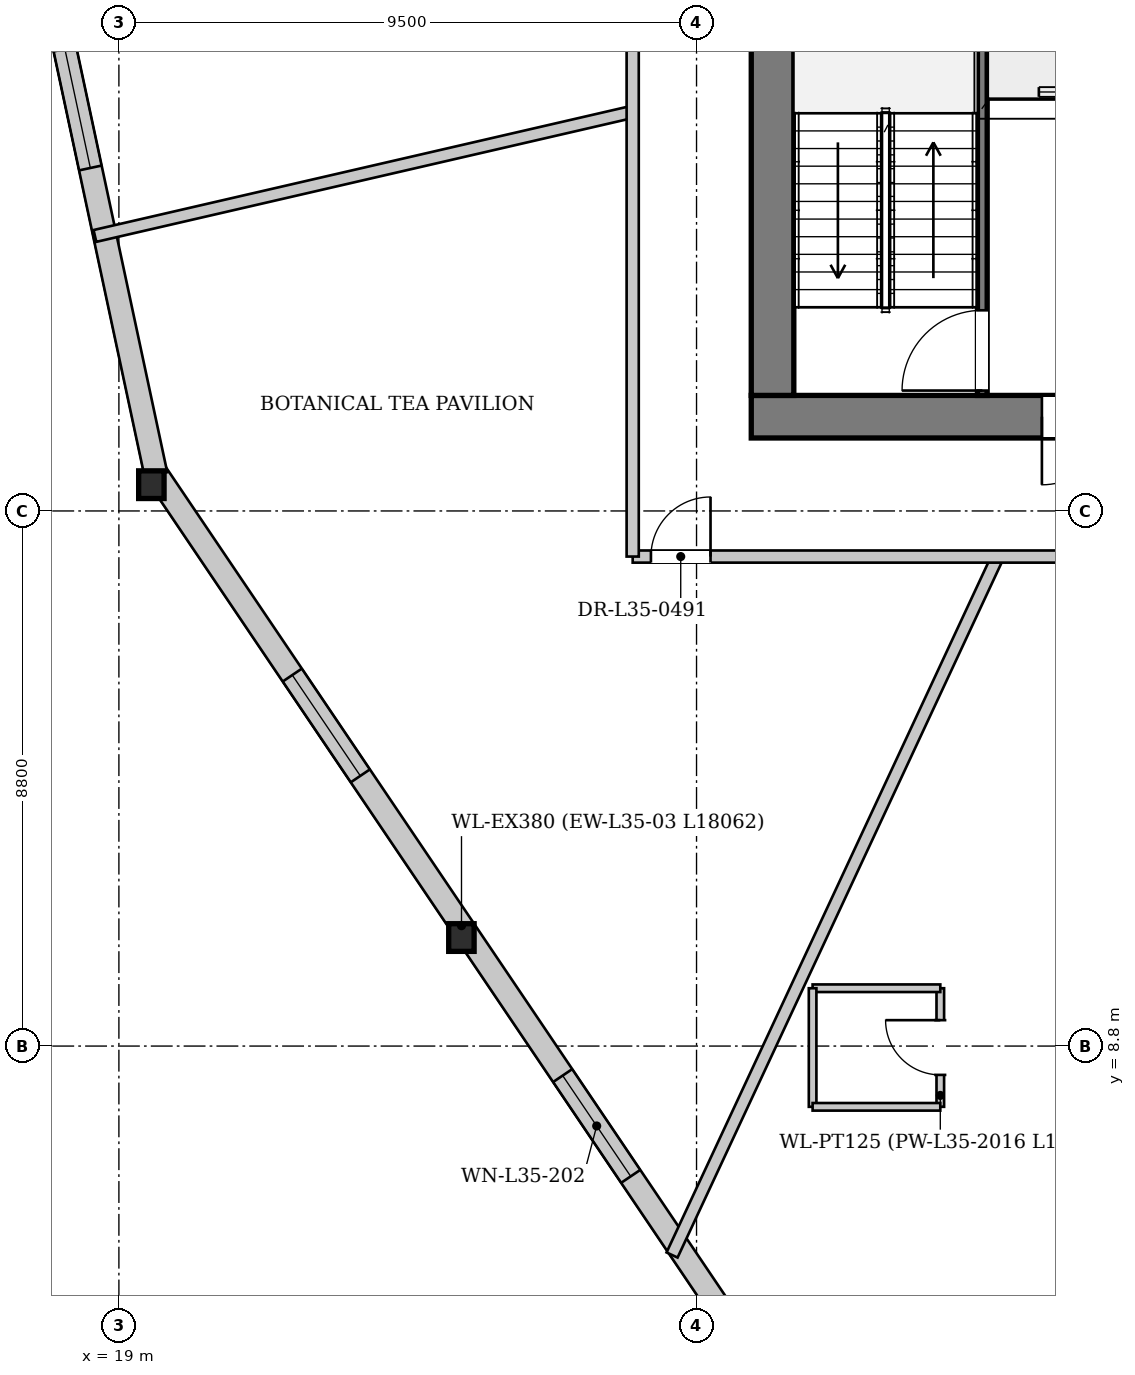
"""IFC4 building model, lengths in metres.
Left out: names, types, materials, properties, quantities, classifications, styles, units other than length and angle.
Written with IfcOpenShell. Run it as: python <this file> out.ifc"""

import sys

from ifc_helpers import new_model, si_unit, direction, frame, frame_2d, origin, origin_2d, place, context, subcontext, project, spatial, rectangle, i_section, extrude, source, transform, mapped, element, fill, save


model = new_model("IFC4")
c1 = context("Model", 3, precision=1e-05, world=origin(), true_north=direction((0.0, 1.0)))
c2 = subcontext(c1, "Body", "Model", "MODEL_VIEW")
j1 = project(units=[si_unit("LENGTHUNIT", "METRE"), si_unit("PLANEANGLEUNIT", "RADIAN")], contexts=[c1])
p1 = place(None, origin())
s1 = spatial("IfcSite", under=j1, at=p1, CompositionType="ELEMENT")
p2 = place(p1, origin())
s2 = spatial("IfcBuilding", under=s1, at=p2, CompositionType="ELEMENT")
p3 = place(p2, frame((0.0, 0.0, 134.1)))
s3 = spatial("IfcBuildingStorey", under=s2, at=p3, CompositionType="ELEMENT", Elevation=134.1)
m1 = source(origin(), c2, "Body", "SweptSolid", [
    extrude(i_section(OverallWidth=0.418, OverallDepth=0.455, WebThickness=0.038, FlangeThickness=0.059, at=origin_2d()), origin(), (0.0, 0.0, 1.0), 3.85),
])
p4 = place(p3, frame((19.424, 18.158, 0.0), z_axis=(0.057269532433, -0.065260629982, 0.996223494417), x_axis=(0.75162568907, 0.659589890409, 0.0)))
e1 = element("IfcColumn", 1, at=p4, inside=s3, PredefinedType="COLUMN", context=c2, shape_type="MappedRepresentation", body=[
    mapped(m1, transform((0.0, 0.0, 0.0), x_axis=(1.0, 0.0, 0.0), y_axis=(0.0, 1.0, 0.0), z_axis=(0.0, 0.0, 1.0), scale=1.0)),
])
m2 = source(origin(), c2, "Body", "SweptSolid", [
    extrude(i_section(OverallWidth=0.418, OverallDepth=0.455, WebThickness=0.038, FlangeThickness=0.059, at=origin_2d()), origin(), (0.0, 0.0, 1.0), 3.852),
])
p5 = place(p3, frame((24.477, 10.673, 0.0), z_axis=(0.081132607454, -0.045827246242, 0.995649217099), x_axis=(0.491810675723, 0.870702164489, 0.0)))
e2 = element("IfcColumn", 2, at=p5, inside=s3, PredefinedType="COLUMN", context=c2, shape_type="MappedRepresentation", body=[
    mapped(m2, transform((0.0, 0.0, 0.0), x_axis=(1.0, 0.0, 0.0), y_axis=(0.0, 1.0, 0.0), z_axis=(0.0, 0.0, 1.0), scale=1.0)),
])
p6 = place(p3, frame((29.688, 3.295, 0.0), z_axis=(0.0, 0.0, 1.0), x_axis=(-0.55956316064, 0.828787710608, 0.0)))
e3 = element("IfcWall", 3, at=p6, inside=s3, PredefinedType="SOLIDWALL", context=c2, shape_type="SweptSolid", body=[
    extrude(rectangle(XDim=18.061, YDim=0.38, at=frame_2d((9.031, 0.0))), origin(), (0.0, 0.0, 1.0), 3.142),
])
p7 = place(p6, frame((4.057, 0.0, 0.222)))
e4 = element("IfcOpeningElement", 4, at=p7, cuts=e3, PredefinedType="OPENING", context=c2, shape_type="SweptSolid", body=[
    extrude(rectangle(XDim=2.0, YDim=2.8, at=frame_2d((1.0, 1.4))), frame((0.0, 0.2, 0.0), z_axis=(0.0, -1.0, 0.0), x_axis=(1.0, 0.0, 0.0)), (0.0, 0.0, 1.0), 0.4),
])
p8 = place(p6, frame((12.004, 0.0, 0.222)))
e5 = element("IfcOpeningElement", 5, at=p8, cuts=e3, PredefinedType="OPENING", context=c2, shape_type="SweptSolid", body=[
    extrude(rectangle(XDim=2.0, YDim=2.8, at=frame_2d((1.0, 1.4))), frame((0.0, 0.2, 0.0), z_axis=(0.0, -1.0, 0.0), x_axis=(1.0, 0.0, 0.0)), (0.0, 0.0, 1.0), 0.4),
])
p9 = place(p3, frame((19.609, 18.198, 0.0), z_axis=(0.0, 0.0, 1.0), x_axis=(-0.209230911942, 0.977866261555, 0.0)))
e6 = element("IfcWall", 6, at=p9, inside=s3, PredefinedType="SOLIDWALL", context=c2, shape_type="SweptSolid", body=[
    extrude(rectangle(XDim=18.062, YDim=0.38, at=frame_2d((9.031, 0.0))), origin(), (0.0, 0.0, 1.0), 3.142),
])
p10 = place(p9, frame((5.157, 0.0, 0.222)))
e7 = element("IfcOpeningElement", 7, at=p10, cuts=e6, PredefinedType="OPENING", context=c2, shape_type="SweptSolid", body=[
    extrude(rectangle(XDim=2.0, YDim=2.8, at=frame_2d((1.0, 1.4))), frame((0.0, 0.2, 0.0), z_axis=(0.0, -1.0, 0.0), x_axis=(1.0, 0.0, 0.0)), (0.0, 0.0, 1.0), 0.4),
])
p11 = place(p9, frame((12.004, 0.0, 0.222)))
e8 = element("IfcOpeningElement", 8, at=p11, cuts=e6, PredefinedType="OPENING", context=c2, shape_type="SweptSolid", body=[
    extrude(rectangle(XDim=2.0, YDim=2.8, at=frame_2d((1.0, 1.4))), frame((0.0, 0.2, 0.0), z_axis=(0.0, -1.0, 0.0), x_axis=(1.0, 0.0, 0.0)), (0.0, 0.0, 1.0), 0.4),
])
p12 = place(p3, frame((46.6, 19.15, 0.0), z_axis=(0.0, 0.0, 1.0), x_axis=(-1.0, 0.0, 0.0)))
e9 = element("IfcWall", 9, at=p12, inside=s3, PredefinedType="SHEAR", context=c2, shape_type="SweptSolid", body=[
    extrude(rectangle(XDim=17.2, YDim=0.7, at=frame_2d((8.6, 0.0))), origin(), (0.0, 0.0, 1.0), 3.75),
])
p13 = place(p12, frame((4.8, 0.0, 0.0)))
e10 = element("IfcOpeningElement", 10, at=p13, cuts=e9, PredefinedType="OPENING", context=c2, shape_type="SweptSolid", body=[
    extrude(rectangle(XDim=1.12, YDim=2.25, at=frame_2d((0.56, 1.125))), frame((0.0, 0.36, 0.0), z_axis=(0.0, -1.0, 0.0), x_axis=(1.0, 0.0, 0.0)), (0.0, 0.0, 1.0), 0.72),
])
p14 = place(p12, frame((11.3, 0.0, 0.0)))
e11 = element("IfcOpeningElement", 11, at=p14, cuts=e9, PredefinedType="OPENING", context=c2, shape_type="SweptSolid", body=[
    extrude(rectangle(XDim=1.12, YDim=2.25, at=frame_2d((0.56, 1.125))), frame((0.0, 0.36, 0.0), z_axis=(0.0, -1.0, 0.0), x_axis=(1.0, 0.0, 0.0)), (0.0, 0.0, 1.0), 0.72),
])
p15 = place(p3, frame((29.75, 19.5, 0.0), z_axis=(0.0, 0.0, 1.0), x_axis=(0.0, 1.0, 0.0)))
e12 = element("IfcWall", 12, at=p15, inside=s3, PredefinedType="SHEAR", context=c2, shape_type="SweptSolid", body=[
    extrude(rectangle(XDim=14.2, YDim=0.7, at=frame_2d((7.1, 0.0))), origin(), (0.0, 0.0, 1.0), 3.75),
])
p16 = place(p15, frame((7.42, 0.0, 0.0)))
e13 = element("IfcOpeningElement", 13, at=p16, cuts=e12, PredefinedType="OPENING", context=c2, shape_type="SweptSolid", body=[
    extrude(rectangle(XDim=1.6, YDim=2.2, at=frame_2d((0.8, 1.1))), frame((0.0, 0.36, 0.0), z_axis=(0.0, -1.0, 0.0), x_axis=(1.0, 0.0, 0.0)), (0.0, 0.0, 1.0), 0.72),
])
p17 = place(p3, frame((33.2, 19.5, 0.0), z_axis=(0.0, 0.0, 1.0), x_axis=(0.0, 1.0, 0.0)))
e14 = element("IfcWall", 14, at=p17, inside=s3, PredefinedType="PARTITIONING", context=c2, shape_type="SweptSolid", body=[
    extrude(rectangle(XDim=7.46, YDim=0.16, at=frame_2d((3.73, 0.0))), origin(), (0.0, 0.0, 1.0), 3.75),
])
p18 = place(p17, frame((0.08, 0.0, 0.0)))
e15 = element("IfcOpeningElement", 15, at=p18, cuts=e14, PredefinedType="OPENING", context=c2, shape_type="SweptSolid", body=[
    extrude(rectangle(XDim=1.32, YDim=2.2, at=frame_2d((0.66, 1.1))), frame((0.0, 0.09, 0.0), z_axis=(0.0, -1.0, 0.0), x_axis=(1.0, 0.0, 0.0)), (0.0, 0.0, 1.0), 0.18),
])
p19 = place(p3, frame((33.28, 24.49, 0.0), z_axis=(0.0, 0.0, 1.0), x_axis=(1.0, 0.0, 0.0)))
e16 = element("IfcWall", 16, at=p19, inside=s3, PredefinedType="PARTITIONING", context=c2, shape_type="SweptSolid", body=[
    extrude(rectangle(XDim=9.44, YDim=0.16, at=frame_2d((4.72, 0.0))), origin(), (0.0, 0.0, 1.0), 3.75),
])
p20 = place(p19, frame((0.85, 0.0, 0.95)))
e17 = element("IfcOpeningElement", 17, at=p20, cuts=e16, PredefinedType="OPENING", context=c2, shape_type="SweptSolid", body=[
    extrude(rectangle(XDim=1.4, YDim=1.8, at=frame_2d((0.7, 0.9))), frame((0.0, 0.09, 0.0), z_axis=(0.0, -1.0, 0.0), x_axis=(1.0, 0.0, 0.0)), (0.0, 0.0, 1.0), 0.18),
])
p21 = place(p3, frame((27.45, 24.164, 0.0), z_axis=(0.0, 0.0, 1.0), x_axis=(-0.97437124521, -0.224945941303, 0.0)))
e18 = element("IfcWall", 18, at=p21, inside=s3, PredefinedType="PARTITIONING", context=c2, shape_type="SweptSolid", body=[
    extrude(rectangle(XDim=9.077, YDim=0.2, at=frame_2d((4.538, 0.0))), origin(), (0.0, 0.0, 1.0), 3.75),
])
p22 = place(p3, frame((33.454, 16.85, 0.0), z_axis=(0.0, 0.0, 1.0), x_axis=(-0.42262812914, -0.906303185727, 0.0)))
e19 = element("IfcWall", 19, at=p22, inside=s3, PredefinedType="PARTITIONING", context=c2, shape_type="SweptSolid", body=[
    extrude(rectangle(XDim=12.674, YDim=0.2, at=frame_2d((6.337, 0.0))), origin(), (0.0, 0.0, 1.0), 3.75),
])
p23 = place(p3, frame((32.509, 7.801, 0.0), z_axis=(0.0, 0.0, 1.0), x_axis=(0.0, 1.0, 0.0)))
e20 = element("IfcWall", 20, at=p23, inside=s3, PredefinedType="PARTITIONING", context=c2, shape_type="SweptSolid", body=[
    extrude(rectangle(XDim=1.95, YDim=0.125, at=frame_2d((0.975, 0.0))), origin(), (0.0, 0.0, 1.0), 3.75),
])
p24 = place(p23, frame((0.525, 0.0, 0.0)))
e21 = element("IfcOpeningElement", 21, at=p24, cuts=e20, PredefinedType="OPENING", context=c2, shape_type="SweptSolid", body=[
    extrude(rectangle(XDim=0.9, YDim=2.1, at=frame_2d((0.45, 1.05))), frame((0.0, 0.073, 0.0), z_axis=(0.0, -1.0, 0.0), x_axis=(1.0, 0.0, 0.0)), (0.0, 0.0, 1.0), 0.145),
])
p25 = place(p3, frame((32.509, 9.751, 0.0), z_axis=(0.0, 0.0, 1.0), x_axis=(-1.0, 0.0, 0.0)))
e22 = element("IfcWall", 22, at=p25, inside=s3, PredefinedType="PARTITIONING", context=c2, shape_type="SweptSolid", body=[
    extrude(rectangle(XDim=2.1, YDim=0.125, at=frame_2d((1.05, 0.0))), origin(), (0.0, 0.0, 1.0), 3.75),
])
p26 = place(p3, frame((30.409, 9.751, 0.0), z_axis=(0.0, 0.0, 1.0), x_axis=(0.0, -1.0, 0.0)))
e23 = element("IfcWall", 23, at=p26, inside=s3, PredefinedType="PARTITIONING", context=c2, shape_type="SweptSolid", body=[
    extrude(rectangle(XDim=1.95, YDim=0.125, at=frame_2d((0.975, 0.0))), origin(), (0.0, 0.0, 1.0), 3.75),
])
p27 = place(p3, frame((30.409, 7.801, 0.0), z_axis=(0.0, 0.0, 1.0), x_axis=(1.0, 0.0, 0.0)))
e24 = element("IfcWall", 24, at=p27, inside=s3, PredefinedType="PARTITIONING", context=c2, shape_type="SweptSolid", body=[
    extrude(rectangle(XDim=2.1, YDim=0.125, at=frame_2d((1.05, 0.0))), origin(), (0.0, 0.0, 1.0), 3.75),
])
p28 = place(p3, frame((27.45, 16.85, 0.0), z_axis=(0.0, 0.0, 1.0), x_axis=(1.0, 0.0, 0.0)))
e25 = element("IfcWall", 25, at=p28, inside=s3, PredefinedType="PARTITIONING", context=c2, shape_type="SweptSolid", body=[
    extrude(rectangle(XDim=8.5, YDim=0.2, at=frame_2d((4.25, 0.0))), origin(), (0.0, 0.0, 1.0), 3.75),
])
p29 = place(p28, frame((0.3, 0.0, 0.0)))
e26 = element("IfcOpeningElement", 26, at=p29, cuts=e25, PredefinedType="OPENING", context=c2, shape_type="SweptSolid", body=[
    extrude(rectangle(XDim=0.98, YDim=2.15, at=frame_2d((0.49, 1.075))), frame((0.0, 0.11, 0.0), z_axis=(0.0, -1.0, 0.0), x_axis=(1.0, 0.0, 0.0)), (0.0, 0.0, 1.0), 0.22),
])
p30 = place(p3, frame((27.45, 16.85, 0.0), z_axis=(0.0, 0.0, 1.0), x_axis=(0.0, 1.0, 0.0)))
e27 = element("IfcWall", 27, at=p30, inside=s3, PredefinedType="PARTITIONING", context=c2, shape_type="SweptSolid", body=[
    extrude(rectangle(XDim=19.5, YDim=0.2, at=frame_2d((9.75, 0.0))), origin(), (0.0, 0.0, 1.0), 3.75),
])
p31 = place(p30, frame((12.66, 0.0, 0.0)))
e28 = element("IfcOpeningElement", 28, at=p31, cuts=e27, PredefinedType="OPENING", context=c2, shape_type="SweptSolid", body=[
    extrude(rectangle(XDim=0.98, YDim=2.15, at=frame_2d((0.49, 1.075))), frame((0.0, 0.11, 0.0), z_axis=(0.0, -1.0, 0.0), x_axis=(1.0, 0.0, 0.0)), (0.0, 0.0, 1.0), 0.22),
])
m3 = source(origin(), c2, "Body", "SweptSolid", [
    extrude(rectangle(XDim=2.0, YDim=2.8, at=frame_2d((1.0, 1.4))), frame((0.0, 0.03, 0.0), z_axis=(0.0, -1.0, 0.0), x_axis=(1.0, 0.0, 0.0)), (0.0, 0.0, 1.0), 0.06),
])
p32 = place(p7, origin())
e29 = element("IfcWindow", 29, at=p32, inside=s3, PartitioningType="SINGLE_PANEL", PredefinedType="WINDOW", context=c2, shape_type="MappedRepresentation", body=[
    mapped(m3, transform((0.0, 0.0, 0.0), x_axis=(1.0, 0.0, 0.0), y_axis=(0.0, 1.0, 0.0), z_axis=(0.0, 0.0, 1.0), scale=1.0)),
])
fill(e4, e29)
p33 = place(p8, origin())
e30 = element("IfcWindow", 30, at=p33, inside=s3, PartitioningType="SINGLE_PANEL", PredefinedType="WINDOW", context=c2, shape_type="MappedRepresentation", body=[
    mapped(m3, transform((0.0, 0.0, 0.0), x_axis=(1.0, 0.0, 0.0), y_axis=(0.0, 1.0, 0.0), z_axis=(0.0, 0.0, 1.0), scale=1.0)),
])
fill(e5, e30)
p34 = place(p10, origin())
e31 = element("IfcWindow", 31, at=p34, inside=s3, PartitioningType="SINGLE_PANEL", PredefinedType="WINDOW", context=c2, shape_type="MappedRepresentation", body=[
    mapped(m3, transform((0.0, 0.0, 0.0), x_axis=(1.0, 0.0, 0.0), y_axis=(0.0, 1.0, 0.0), z_axis=(0.0, 0.0, 1.0), scale=1.0)),
])
fill(e7, e31)
m4 = source(origin(), c2, "Body", "SweptSolid", [
    extrude(rectangle(XDim=1.12, YDim=2.25, at=frame_2d((0.56, 1.125))), frame((0.0, 0.025, 0.0), z_axis=(0.0, -1.0, 0.0), x_axis=(1.0, 0.0, 0.0)), (0.0, 0.0, 1.0), 0.05),
])
p35 = place(p14, origin())
e32 = element("IfcDoor", 32, at=p35, inside=s3, OperationType="SINGLE_SWING_RIGHT", PredefinedType="DOOR", context=c2, shape_type="MappedRepresentation", body=[
    mapped(m4, transform((0.0, 0.0, 0.0), x_axis=(1.0, 0.0, 0.0), y_axis=(0.0, 1.0, 0.0), z_axis=(0.0, 0.0, 1.0), scale=1.0)),
])
fill(e11, e32)
m5 = source(origin(), c2, "Body", "SweptSolid", [
    extrude(rectangle(XDim=1.32, YDim=2.2, at=frame_2d((0.66, 1.1))), frame((0.0, 0.025, 0.0), z_axis=(0.0, -1.0, 0.0), x_axis=(1.0, 0.0, 0.0)), (0.0, 0.0, 1.0), 0.05),
])
p36 = place(p18, origin())
e33 = element("IfcDoor", 33, at=p36, inside=s3, OperationType="SINGLE_SWING_LEFT", PredefinedType="DOOR", context=c2, shape_type="MappedRepresentation", body=[
    mapped(m5, transform((0.0, 0.0, 0.0), x_axis=(1.0, 0.0, 0.0), y_axis=(0.0, 1.0, 0.0), z_axis=(0.0, 0.0, 1.0), scale=1.0)),
])
fill(e15, e33)
m6 = source(origin(), c2, "Body", "SweptSolid", [
    extrude(rectangle(XDim=0.9, YDim=2.1, at=frame_2d((0.45, 1.05))), frame((0.0, 0.025, 0.0), z_axis=(0.0, -1.0, 0.0), x_axis=(1.0, 0.0, 0.0)), (0.0, 0.0, 1.0), 0.05),
])
p37 = place(p24, origin())
e34 = element("IfcDoor", 34, at=p37, inside=s3, OperationType="SINGLE_SWING_RIGHT", PredefinedType="DOOR", context=c2, shape_type="MappedRepresentation", body=[
    mapped(m6, transform((0.0, 0.0, 0.0), x_axis=(1.0, 0.0, 0.0), y_axis=(0.0, 1.0, 0.0), z_axis=(0.0, 0.0, 1.0), scale=1.0)),
])
fill(e21, e34)
m7 = source(origin(), c2, "Body", "SweptSolid", [
    extrude(rectangle(XDim=0.98, YDim=2.15, at=frame_2d((0.49, 1.075))), frame((0.0, 0.025, 0.0), z_axis=(0.0, -1.0, 0.0), x_axis=(1.0, 0.0, 0.0)), (0.0, 0.0, 1.0), 0.05),
])
p38 = place(p29, origin())
e35 = element("IfcDoor", 35, at=p38, inside=s3, OperationType="SINGLE_SWING_RIGHT", PredefinedType="DOOR", context=c2, shape_type="MappedRepresentation", body=[
    mapped(m7, transform((0.0, 0.0, 0.0), x_axis=(1.0, 0.0, 0.0), y_axis=(0.0, 1.0, 0.0), z_axis=(0.0, 0.0, 1.0), scale=1.0)),
])
fill(e26, e35)
m8 = source(origin(), c2, "Body", "SweptSolid", [
    extrude(rectangle(XDim=1.4, YDim=1.8, at=frame_2d((0.7, 0.9))), frame((0.0, 0.03, 0.0), z_axis=(0.0, -1.0, 0.0), x_axis=(1.0, 0.0, 0.0)), (0.0, 0.0, 1.0), 0.06),
])
p39 = place(p20, origin())
e36 = element("IfcWindow", 36, at=p39, inside=s3, PartitioningType="SINGLE_PANEL", PredefinedType="WINDOW", context=c2, shape_type="MappedRepresentation", body=[
    mapped(m8, transform((0.0, 0.0, 0.0), x_axis=(1.0, 0.0, 0.0), y_axis=(0.0, 1.0, 0.0), z_axis=(0.0, 0.0, 1.0), scale=1.0)),
])
fill(e17, e36)
save(model, sys.argv[1])
